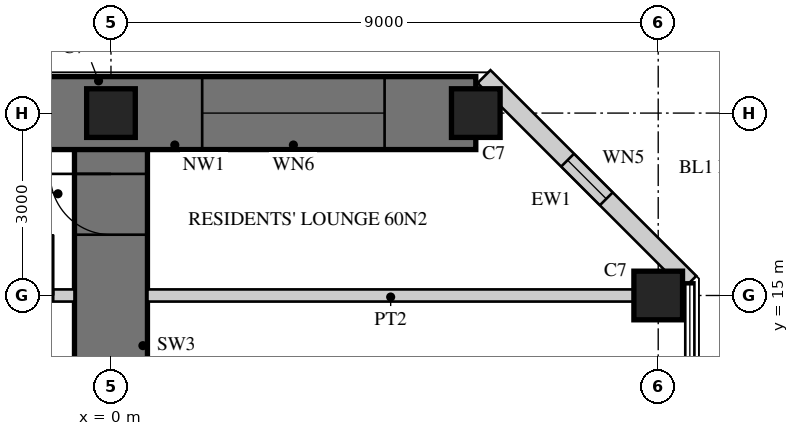
"""IFC4 building model, lengths in metres.
Left out: names, types, materials, properties, quantities, classifications, styles, units other than length and angle.
Written with IfcOpenShell. Run it as: python <this file> out.ifc"""

import sys

from ifc_helpers import new_model, si_unit, direction, frame, frame_2d, origin, origin_2d, place, context, subcontext, project, spatial, rectangle, hollow_rectangle, extrude, element, fill, save


model = new_model("IFC4")
c1 = context("Model", 3, precision=1e-05, world=origin(), true_north=direction((0.0, 1.0)))
c2 = subcontext(c1, "Body", "Model", "MODEL_VIEW")
j1 = project(units=[si_unit("LENGTHUNIT", "METRE"), si_unit("PLANEANGLEUNIT", "RADIAN")], contexts=[c1])
p1 = place(None, origin())
s1 = spatial("IfcSite", under=j1, at=p1, CompositionType="ELEMENT")
p2 = place(p1, origin())
s2 = spatial("IfcBuilding", under=s1, at=p2, CompositionType="ELEMENT")
p3 = place(p2, frame((0.0, 0.0, 235.7)))
s3 = spatial("IfcBuildingStorey", under=s2, at=p3, CompositionType="ELEMENT", Elevation=235.7)
p4 = place(p3, frame((0.0, 9.0, 0.0), z_axis=(0.0, 0.0, 1.0), x_axis=(0.0, 1.0, 0.0)))
e1 = element("IfcWall", 1, at=p4, inside=s3, PredefinedType="SHEAR", context=c2, shape_type="SweptSolid", body=[
    extrude(rectangle(XDim=9.0, YDim=1.2, at=frame_2d((4.5, 0.0))), origin(), (0.0, 0.0, 1.0), 3.4),
])
p5 = place(p4, frame((3.8, 0.0, 0.0)))
e2 = element("IfcOpeningElement", 2, at=p5, cuts=e1, PredefinedType="OPENING", context=c2, shape_type="SweptSolid", body=[
    extrude(rectangle(XDim=1.0, YDim=2.15, at=frame_2d((0.5, 1.075))), frame((0.0, 0.61, 0.0), z_axis=(0.0, -1.0, 0.0), x_axis=(1.0, 0.0, 0.0)), (0.0, 0.0, 1.0), 1.22),
])
p6 = place(p4, frame((7.0, 0.0, 0.0)))
e3 = element("IfcOpeningElement", 3, at=p6, cuts=e1, PredefinedType="OPENING", context=c2, shape_type="SweptSolid", body=[
    extrude(rectangle(XDim=1.0, YDim=2.2, at=frame_2d((0.5, 1.1))), frame((0.0, 0.61, 0.0), z_axis=(0.0, -1.0, 0.0), x_axis=(1.0, 0.0, 0.0)), (0.0, 0.0, 1.0), 1.22),
])
p7 = place(p3, frame((6.0, 18.0, 0.0), z_axis=(0.0, 0.0, 1.0), x_axis=(-1.0, 0.0, 0.0)))
e4 = element("IfcWall", 4, at=p7, inside=s3, PredefinedType="SHEAR", context=c2, shape_type="SweptSolid", body=[
    extrude(rectangle(XDim=12.0, YDim=1.2, at=frame_2d((6.0, 0.0))), origin(), (0.0, 0.0, 1.0), 3.4),
])
p8 = place(p7, frame((1.5, 0.0, 0.6)))
e5 = element("IfcOpeningElement", 5, at=p8, cuts=e4, PredefinedType="OPENING", context=c2, shape_type="SweptSolid", body=[
    extrude(rectangle(XDim=3.0, YDim=2.4, at=frame_2d((1.5, 1.2))), frame((0.0, 0.61, 0.0), z_axis=(0.0, -1.0, 0.0), x_axis=(1.0, 0.0, 0.0)), (0.0, 0.0, 1.0), 1.22),
])
p9 = place(p7, frame((7.5, 0.0, 0.6)))
e6 = element("IfcOpeningElement", 6, at=p9, cuts=e4, PredefinedType="OPENING", context=c2, shape_type="SweptSolid", body=[
    extrude(rectangle(XDim=3.0, YDim=2.4, at=frame_2d((1.5, 1.2))), frame((0.0, 0.61, 0.0), z_axis=(0.0, -1.0, 0.0), x_axis=(1.0, 0.0, 0.0)), (0.0, 0.0, 1.0), 1.22),
])
for number, where, z_axis, x_axis in (
    (7, (9.0, 15.0, 0.0), (0.0, 0.0, 1.0), (1.0, 0.0, 0.0)),
    (8, (6.0, 18.0, 0.0), (0.0, 0.0, 1.0), (1.0, 0.0, 0.0)),
    (9, (0.0, 18.0, 0.0), (0.0, 0.0, 1.0), (1.0, 0.0, 0.0)),
):
    element("IfcColumn", number, at=place(p3, frame(where, z_axis=z_axis, x_axis=x_axis)), inside=s3, PredefinedType="COLUMN", context=c2, shape_type="SweptSolid", body=[
        extrude(rectangle(XDim=0.8, YDim=0.8, at=origin_2d()), origin(), (0.0, 0.0, 1.0), 3.4),
    ])
p10 = place(p3, frame((9.52, 15.215, 0.0), z_axis=(0.0, 0.0, 1.0), x_axis=(-0.707081278264, 0.707132283189, 0.0)))
e10 = element("IfcWall", 10, at=p10, inside=s3, PredefinedType="SOLIDWALL", context=c2, shape_type="SweptSolid", body=[
    extrude(rectangle(XDim=4.787, YDim=0.3, at=frame_2d((2.393, 0.0))), origin(), (0.0, 0.0, 1.0), 3.22),
])
p11 = place(p10, frame((1.943, 0.0, 0.3)))
e11 = element("IfcOpeningElement", 11, at=p11, cuts=e10, PredefinedType="OPENING", context=c2, shape_type="SweptSolid", body=[
    extrude(rectangle(XDim=0.9, YDim=2.4, at=frame_2d((0.45, 1.2))), frame((0.0, 0.16, 0.0), z_axis=(0.0, -1.0, 0.0), x_axis=(1.0, 0.0, 0.0)), (0.0, 0.0, 1.0), 0.32),
])
p12 = place(p3, frame((8.6, 15.0, 0.0), z_axis=(0.0, 0.0, 1.0), x_axis=(-1.0, 0.0, 0.0)))
e12 = element("IfcWall", 12, at=p12, inside=s3, PredefinedType="SOLIDWALL", context=c2, shape_type="SweptSolid", body=[
    extrude(rectangle(XDim=8.0, YDim=0.2, at=frame_2d((4.0, 0.0))), origin(), (0.0, 0.0, 1.0), 2.52),
])
p13 = place(p3, frame((-0.6, 15.0, 0.0), z_axis=(0.0, 0.0, 1.0), x_axis=(-1.0, 0.0, 0.0)))
e13 = element("IfcWall", 13, at=p13, inside=s3, PredefinedType="SOLIDWALL", context=c2, shape_type="SweptSolid", body=[
    extrude(rectangle(XDim=8.0, YDim=0.2, at=frame_2d((4.0, 0.0))), origin(), (0.0, 0.0, 1.0), 2.52),
])
p14 = place(p13, frame((0.35, 0.0, 0.0)))
e14 = element("IfcOpeningElement", 14, at=p14, cuts=e13, PredefinedType="OPENING", context=c2, shape_type="SweptSolid", body=[
    extrude(rectangle(XDim=1.0, YDim=2.2, at=frame_2d((0.5, 1.1))), frame((0.0, 0.11, 0.0), z_axis=(0.0, -1.0, 0.0), x_axis=(1.0, 0.0, 0.0)), (0.0, 0.0, 1.0), 0.22),
])
p15 = place(p11, origin())
e15 = element("IfcWindow", 15, at=p15, inside=s3, PartitioningType="SINGLE_PANEL", PredefinedType="WINDOW", context=c2, shape_type="SweptSolid", body=[
    extrude(hollow_rectangle(XDim=0.9, YDim=2.4, WallThickness=0.06, at=frame_2d((0.45, 1.2))), frame((0.0, 0.03, 0.0), z_axis=(0.0, -1.0, 0.0), x_axis=(1.0, 0.0, 0.0)), (0.0, 0.0, 1.0), 0.06),
    extrude(rectangle(XDim=0.779, YDim=2.279, at=frame_2d((0.45, 1.2))), frame((0.0, 0.03, 0.0), z_axis=(0.0, -1.0, 0.0), x_axis=(1.0, 0.0, 0.0)), (0.0, 0.0, 1.0), 0.06),
])
fill(e11, e15)
p16 = place(p8, origin())
e16 = element("IfcWindow", 16, at=p16, inside=s3, PartitioningType="SINGLE_PANEL", PredefinedType="WINDOW", context=c2, shape_type="SweptSolid", body=[
    extrude(hollow_rectangle(XDim=3.0, YDim=2.4, WallThickness=0.06, at=frame_2d((1.5, 1.2))), frame((0.0, 0.03, 0.0), z_axis=(0.0, -1.0, 0.0), x_axis=(1.0, 0.0, 0.0)), (0.0, 0.0, 1.0), 0.06),
    extrude(rectangle(XDim=2.879, YDim=2.279, at=frame_2d((1.5, 1.2))), frame((0.0, 0.03, 0.0), z_axis=(0.0, -1.0, 0.0), x_axis=(1.0, 0.0, 0.0)), (0.0, 0.0, 1.0), 0.06),
])
fill(e5, e16)
p17 = place(p14, frame((1.0, 0.0, 0.0), z_axis=(0.0, 0.0, 1.0), x_axis=(-1.0, 0.0, 0.0)))
e17 = element("IfcDoor", 17, at=p17, inside=s3, OperationType="SINGLE_SWING_RIGHT", PredefinedType="DOOR", context=c2, shape_type="SweptSolid", body=[
    extrude(rectangle(XDim=1.0, YDim=2.2, at=frame_2d((0.5, 1.1))), frame((0.0, 0.025, 0.0), z_axis=(0.0, -1.0, 0.0), x_axis=(1.0, 0.0, 0.0)), (0.0, 0.0, 1.0), 0.05),
])
fill(e14, e17)
p18 = place(p6, origin())
e18 = element("IfcDoor", 18, at=p18, inside=s3, OperationType="SINGLE_SWING_RIGHT", PredefinedType="DOOR", context=c2, shape_type="SweptSolid", body=[
    extrude(rectangle(XDim=1.0, YDim=2.2, at=frame_2d((0.5, 1.1))), frame((0.0, 0.025, 0.0), z_axis=(0.0, -1.0, 0.0), x_axis=(1.0, 0.0, 0.0)), (0.0, 0.0, 1.0), 0.05),
])
fill(e3, e18)
save(model, sys.argv[1])
